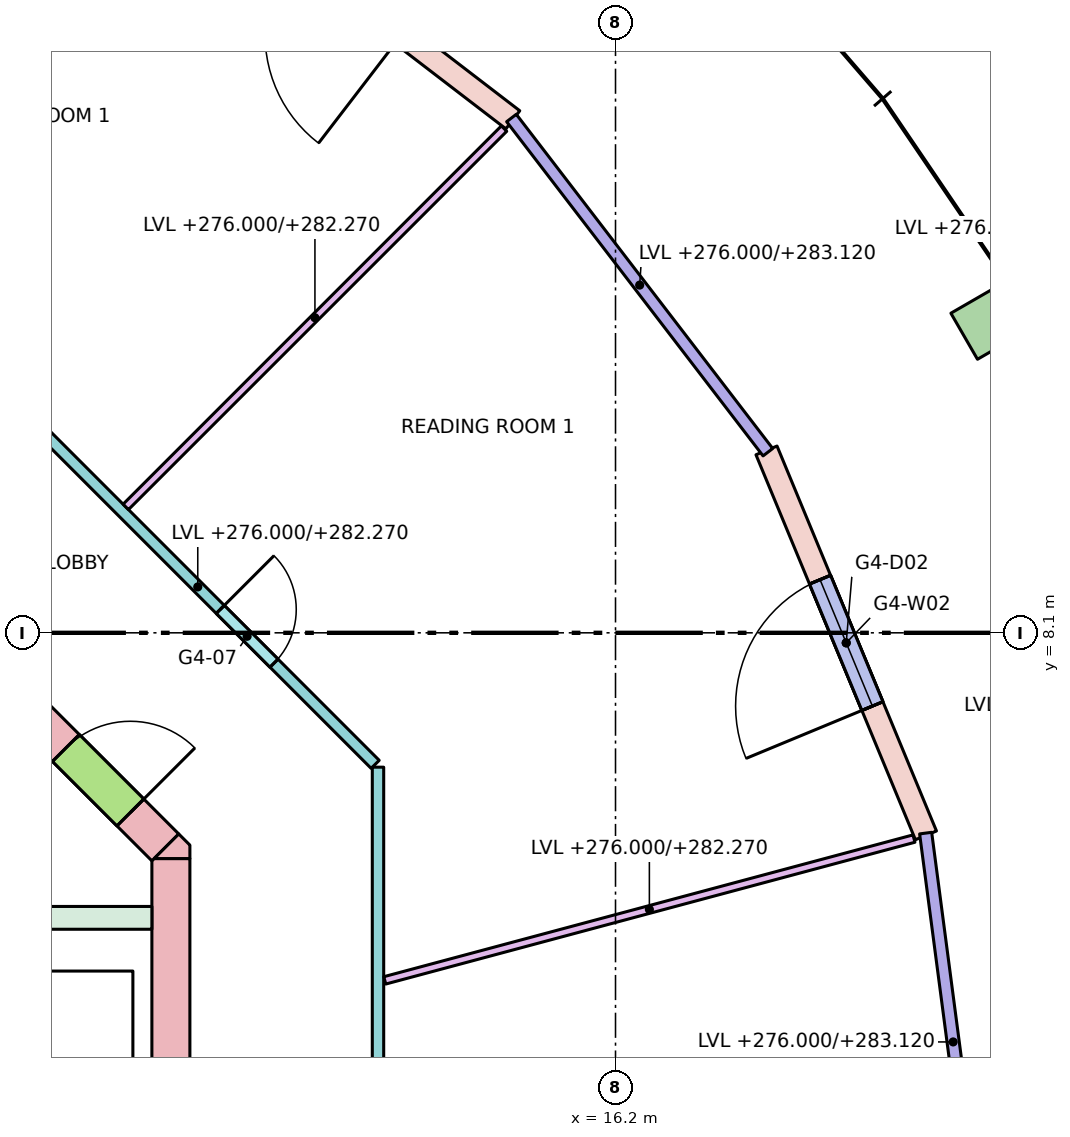
"""IFC4 building model, lengths in metres.
Left out: names, types, materials, properties, quantities, classifications, styles, units other than length and angle.
Written with IfcOpenShell. Run it as: python <this file> out.ifc"""

import sys

from ifc_helpers import new_model, si_unit, direction, frame, frame_2d, origin, origin_2d, place, context, subcontext, project, spatial, polyline, rectangle, outline, extrude, element, fill, save


model = new_model("IFC4")
c1 = context("Model", 3, precision=1e-05, world=origin(), true_north=direction((0.0, 1.0)))
c2 = subcontext(c1, "Body", "Model", "MODEL_VIEW")
j1 = project(units=[si_unit("LENGTHUNIT", "METRE"), si_unit("PLANEANGLEUNIT", "RADIAN")], contexts=[c1])
p1 = place(None, origin())
s1 = spatial("IfcSite", under=j1, at=p1, CompositionType="ELEMENT")
p2 = place(p1, origin())
s2 = spatial("IfcBuilding", under=s1, at=p2, CompositionType="ELEMENT")
p3 = place(p2, frame((0.0, 0.0, 276.0)))
s3 = spatial("IfcBuildingStorey", under=s2, at=p3, CompositionType="ELEMENT", Elevation=276.0)
p4 = place(p3, frame((21.219, 12.251, 0.034), z_axis=(0.058400484098, 0.033684920862, 0.997724766438), x_axis=(-0.4996371378, 0.866234801039, 0.0)))
e1 = element("IfcColumn", 1, at=p4, inside=s3, PredefinedType="COLUMN", context=c2, shape_type="SweptSolid", body=[
    extrude(rectangle(XDim=0.7, YDim=1.0, at=origin_2d()), origin(), (0.0, 0.0, 1.0), 7.349),
])
p5 = place(p3, frame((10.35, -5.13, -0.28), z_axis=(0.0, 0.0, 1.0), x_axis=(0.0, 1.0, 0.0)))
e2 = element("IfcWall", 2, at=p5, inside=s3, PredefinedType="SHEAR", context=c2, shape_type="SweptSolid", body=[
    extrude(rectangle(XDim=10.26, YDim=0.5, at=frame_2d((5.13, 0.0))), origin(), (0.0, 0.0, 1.0), 7.4),
])
p6 = place(p5, frame((4.13, 0.0, 0.28)))
e3 = element("IfcOpeningElement", 3, at=p6, cuts=e2, PredefinedType="OPENING", context=c2, shape_type="SweptSolid", body=[
    extrude(rectangle(XDim=2.0, YDim=2.1, at=frame_2d((1.0, 1.05))), frame((0.0, 0.26, 0.0), z_axis=(0.0, -1.0, 0.0), x_axis=(1.0, 0.0, 0.0)), (0.0, 0.0, 1.0), 0.52),
])
p7 = place(p3, frame((7.277, 8.277, -0.28), z_axis=(0.0, 0.0, 1.0), x_axis=(0.707106781187, -0.707106781187, 0.0)))
e4 = element("IfcWall", 4, at=p7, inside=s3, PredefinedType="SHEAR", context=c2, shape_type="SweptSolid", body=[
    extrude(rectangle(XDim=4.243, YDim=0.5, at=frame_2d((2.121, 0.0))), origin(), (0.0, 0.0, 1.0), 7.4),
])
p8 = place(p7, frame((2.393, 0.0, 0.28)))
e5 = element("IfcOpeningElement", 5, at=p8, cuts=e4, PredefinedType="OPENING", context=c2, shape_type="SweptSolid", body=[
    extrude(rectangle(XDim=1.2, YDim=2.1, at=frame_2d((0.6, 1.05))), frame((0.0, 0.26, 0.0), z_axis=(0.0, -1.0, 0.0), x_axis=(1.0, 0.0, 0.0)), (0.0, 0.0, 1.0), 0.52),
])
p9 = place(p3, frame((0.0, 0.0, -0.28)))
e6 = element("IfcWall", 6, at=p9, inside=s3, PredefinedType="SHEAR", context=c2, shape_type="SweptSolid", body=[
    extrude(outline(polyline([(10.6, 5.307), (10.6, 5.13), (10.13, 5.13), (10.454, 5.454), (10.6, 5.307)])), origin(), (0.0, 0.0, 1.0), 7.4),
])
p10 = place(p3, frame((2.0, 4.35, 0.0), z_axis=(0.0, 0.0, 1.0), x_axis=(1.0, 0.0, 0.0)))
e7 = element("IfcWall", 7, at=p10, inside=s3, PredefinedType="SOLIDWALL", context=c2, shape_type="SweptSolid", body=[
    extrude(rectangle(XDim=8.1, YDim=0.3, at=frame_2d((4.05, 0.0))), origin(), (0.0, 0.0, 1.0), 7.12),
])
p11 = place(p3, frame((20.284, 5.435, 0.0), z_axis=(0.0, 0.0, 1.0), x_axis=(-0.382688740813, 0.923877333662, 0.0)))
e8 = element("IfcWall", 8, at=p11, inside=s3, PredefinedType="STANDARD", context=c2, shape_type="SweptSolid", body=[
    extrude(rectangle(XDim=5.482, YDim=0.3, at=frame_2d((2.741, 0.0))), origin(), (0.0, 0.0, 1.0), 7.12),
])
p12 = place(p11, frame((1.841, 0.0, 0.0)))
e9 = element("IfcOpeningElement", 9, at=p12, cuts=e8, PredefinedType="OPENING", context=c2, shape_type="SweptSolid", body=[
    extrude(rectangle(XDim=1.8, YDim=2.4, at=frame_2d((0.9, 1.2))), frame((0.0, 0.16, 0.0), z_axis=(0.0, -1.0, 0.0), x_axis=(1.0, 0.0, 0.0)), (0.0, 0.0, 1.0), 0.32),
])
p13 = place(p11, frame((1.841, 0.0, 2.8)))
e10 = element("IfcOpeningElement", 10, at=p13, cuts=e8, PredefinedType="OPENING", context=c2, shape_type="SweptSolid", body=[
    extrude(rectangle(XDim=1.8, YDim=4.1, at=frame_2d((0.9, 2.05))), frame((0.0, 0.16, 0.0), z_axis=(0.0, -1.0, 0.0), x_axis=(1.0, 0.0, 0.0)), (0.0, 0.0, 1.0), 0.32),
])
p14 = place(p3, frame((14.849, 14.849, 0.0), z_axis=(0.0, 0.0, 1.0), x_axis=(-0.793335336593, 0.608784891166, 0.0)))
e11 = element("IfcWall", 11, at=p14, inside=s3, PredefinedType="STANDARD", context=c2, shape_type="SweptSolid", body=[
    extrude(rectangle(XDim=5.482, YDim=0.3, at=frame_2d((2.741, 0.0))), origin(), (0.0, 0.0, 1.0), 7.12),
])
p15 = place(p14, frame((1.841, 0.0, 0.0)))
e12 = element("IfcOpeningElement", 12, at=p15, cuts=e11, PredefinedType="OPENING", context=c2, shape_type="SweptSolid", body=[
    extrude(rectangle(XDim=1.8, YDim=2.4, at=frame_2d((0.9, 1.2))), frame((0.0, 0.16, 0.0), z_axis=(0.0, -1.0, 0.0), x_axis=(1.0, 0.0, 0.0)), (0.0, 0.0, 1.0), 0.32),
])
p16 = place(p14, frame((1.841, 0.0, 2.8)))
e13 = element("IfcOpeningElement", 13, at=p16, cuts=e11, PredefinedType="OPENING", context=c2, shape_type="SweptSolid", body=[
    extrude(rectangle(XDim=1.8, YDim=4.1, at=frame_2d((0.9, 2.05))), frame((0.0, 0.16, 0.0), z_axis=(0.0, -1.0, 0.0), x_axis=(1.0, 0.0, 0.0)), (0.0, 0.0, 1.0), 0.32),
])
p17 = place(p3, frame((8.369, 11.038, 0.0), z_axis=(0.0, 0.0, 1.0), x_axis=(0.707106781187, -0.707106781187, 0.0)))
e14 = element("IfcWall", 14, at=p17, inside=s3, PredefinedType="PARTITIONING", context=c2, shape_type="SweptSolid", body=[
    extrude(rectangle(XDim=6.602, YDim=0.15, at=frame_2d((3.301, 0.0))), origin(), (0.0, 0.0, 1.0), 6.27),
])
p18 = place(p17, frame((3.719, 0.0, 0.0)))
e15 = element("IfcOpeningElement", 15, at=p18, cuts=e14, PredefinedType="OPENING", context=c2, shape_type="SweptSolid", body=[
    extrude(rectangle(XDim=1.0, YDim=2.1, at=frame_2d((0.5, 1.05))), frame((0.0, 0.085, 0.0), z_axis=(0.0, -1.0, 0.0), x_axis=(1.0, 0.0, 0.0)), (0.0, 0.0, 1.0), 0.17),
])
p19 = place(p3, frame((13.075, 6.332, 0.0), z_axis=(0.0, 0.0, 1.0), x_axis=(0.0, -1.0, 0.0)))
e16 = element("IfcWall", 16, at=p19, inside=s3, PredefinedType="PARTITIONING", context=c2, shape_type="SweptSolid", body=[
    extrude(rectangle(XDim=12.665, YDim=0.15, at=frame_2d((6.332, 0.0))), origin(), (0.0, 0.0, 1.0), 6.27),
])
p20 = place(p19, frame((6.821, 0.0, 0.0)))
e17 = element("IfcOpeningElement", 17, at=p20, cuts=e16, PredefinedType="OPENING", context=c2, shape_type="SweptSolid", body=[
    extrude(rectangle(XDim=1.8, YDim=2.1, at=frame_2d((0.9, 1.05))), frame((0.0, 0.085, 0.0), z_axis=(0.0, -1.0, 0.0), x_axis=(1.0, 0.0, 0.0)), (0.0, 0.0, 1.0), 0.17),
])
p21 = place(p3, frame((13.164, 3.527, 0.0), z_axis=(0.0, 0.0, 1.0), x_axis=(0.965929002199, 0.258807192153, 0.0)))
e18 = element("IfcWall", 18, at=p21, inside=s3, PredefinedType="PARTITIONING", context=c2, shape_type="SweptSolid", body=[
    extrude(rectangle(XDim=7.208, YDim=0.1, at=frame_2d((3.604, 0.0))), origin(), (0.0, 0.0, 1.0), 6.27),
])
p22 = place(p3, frame((9.757, 9.757, 0.0), z_axis=(0.0, 0.0, 1.0), x_axis=(0.707106781187, 0.707106781187, 0.0)))
e19 = element("IfcWall", 19, at=p22, inside=s3, PredefinedType="PARTITIONING", context=c2, shape_type="SweptSolid", body=[
    extrude(rectangle(XDim=7.039, YDim=0.1, at=frame_2d((3.52, 0.0))), origin(), (0.0, 0.0, 1.0), 6.27),
])
p23 = place(p12, origin())
e20 = element("IfcDoor", 20, at=p23, inside=s3, OperationType="SINGLE_SWING_LEFT", PredefinedType="DOOR", context=c2, shape_type="SweptSolid", body=[
    extrude(rectangle(XDim=1.8, YDim=2.4, at=frame_2d((0.9, 1.2))), frame((0.0, 0.025, 0.0), z_axis=(0.0, -1.0, 0.0), x_axis=(1.0, 0.0, 0.0)), (0.0, 0.0, 1.0), 0.05),
])
fill(e9, e20)
p24 = place(p13, origin())
e21 = element("IfcWindow", 21, at=p24, inside=s3, PartitioningType="SINGLE_PANEL", PredefinedType="WINDOW", context=c2, shape_type="SweptSolid", body=[
    extrude(rectangle(XDim=1.8, YDim=4.1, at=frame_2d((0.9, 2.05))), frame((0.0, 0.03, 0.0), z_axis=(0.0, -1.0, 0.0), x_axis=(1.0, 0.0, 0.0)), (0.0, 0.0, 1.0), 0.06),
])
fill(e10, e21)
p25 = place(p8, origin())
e22 = element("IfcDoor", 22, at=p25, inside=s3, OperationType="SINGLE_SWING_RIGHT", PredefinedType="DOOR", context=c2, shape_type="SweptSolid", body=[
    extrude(rectangle(XDim=1.2, YDim=2.1, at=frame_2d((0.6, 1.05))), frame((0.0, 0.025, 0.0), z_axis=(0.0, -1.0, 0.0), x_axis=(1.0, 0.0, 0.0)), (0.0, 0.0, 1.0), 0.05),
])
fill(e5, e22)
p26 = place(p18, origin())
e23 = element("IfcDoor", 23, at=p26, inside=s3, OperationType="SINGLE_SWING_LEFT", PredefinedType="DOOR", context=c2, shape_type="SweptSolid", body=[
    extrude(rectangle(XDim=1.0, YDim=2.1, at=frame_2d((0.5, 1.05))), frame((0.0, 0.025, 0.0), z_axis=(0.0, -1.0, 0.0), x_axis=(1.0, 0.0, 0.0)), (0.0, 0.0, 1.0), 0.05),
])
fill(e15, e23)
save(model, sys.argv[1])
